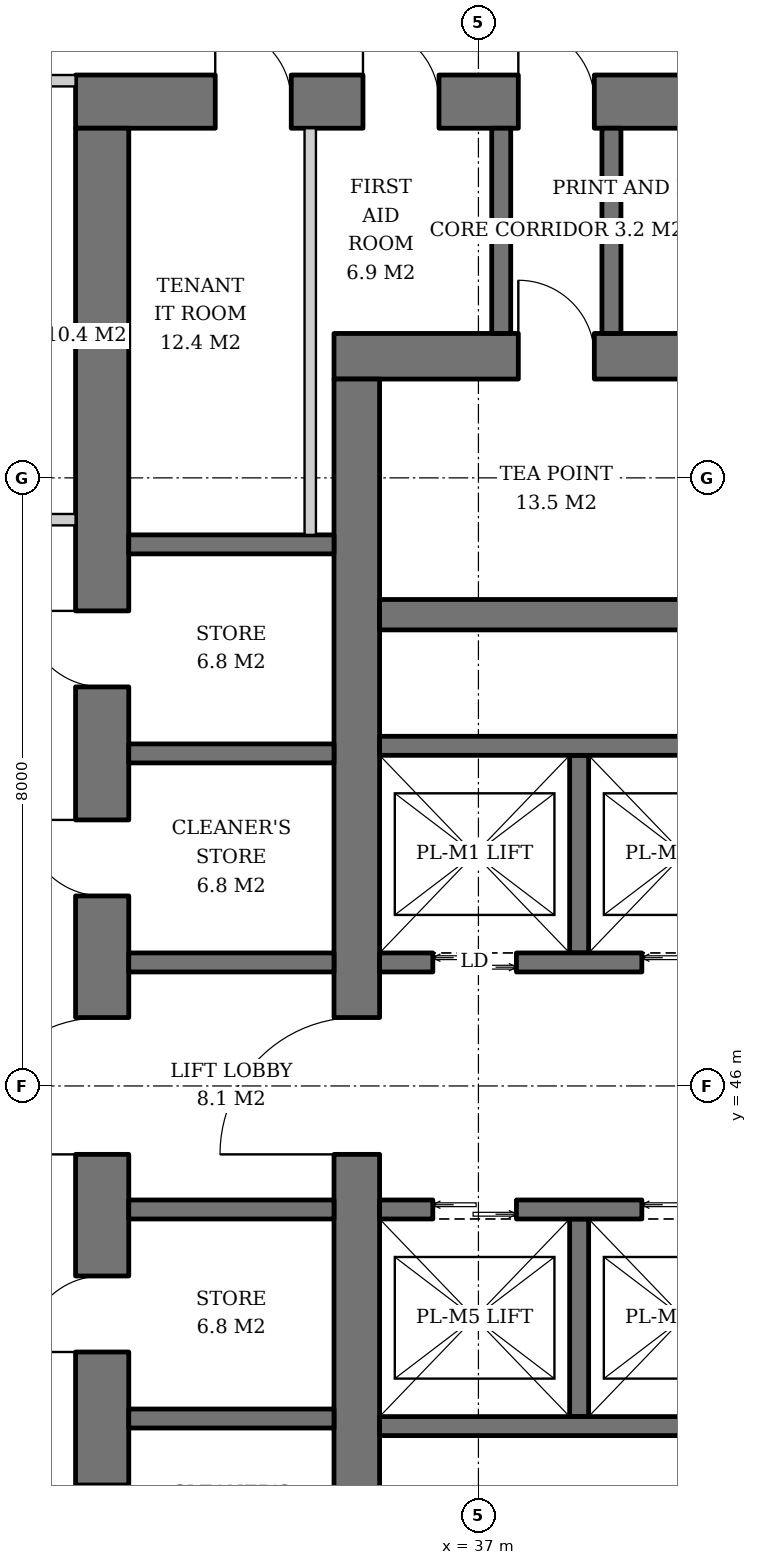
"""IFC4 building model, lengths in metres.
Left out: names, types, materials, properties, quantities, classifications, styles, units other than length and angle.
Written with IfcOpenShell. Run it as: python <this file> out.ifc"""

import sys

from ifc_helpers import new_model, si_unit, direction, frame, frame_2d, origin, place, context, subcontext, project, spatial, rectangle, extrude, element, fill, save


model = new_model("IFC4")
c1 = context("Model", 3, precision=1e-05, world=origin(), true_north=direction((0.0, 1.0)))
c2 = subcontext(c1, "Body", "Model", "MODEL_VIEW")
j1 = project(units=[si_unit("LENGTHUNIT", "METRE"), si_unit("PLANEANGLEUNIT", "RADIAN")], contexts=[c1])
p1 = place(None, origin())
s1 = spatial("IfcSite", under=j1, at=p1, CompositionType="ELEMENT")
p2 = place(p1, origin())
s2 = spatial("IfcBuilding", under=s1, at=p2, CompositionType="ELEMENT")
p3 = place(p2, frame((0.0, 0.0, 154.0)))
s3 = spatial("IfcBuildingStorey", under=s2, at=p3, CompositionType="ELEMENT", Elevation=154.0)
p4 = place(p3, frame((35.1, 55.6, 0.0), z_axis=(0.0, 0.0, 1.0), x_axis=(1.0, 0.0, 0.0)))
e1 = element("IfcWall", 1, at=p4, inside=s3, PredefinedType="SHEAR", context=c2, shape_type="SweptSolid", body=[
    extrude(rectangle(XDim=19.8, YDim=0.6, at=frame_2d((9.9, 0.0))), origin(), (0.0, 0.0, 1.0), 3.8),
])
p5 = place(p4, frame((14.54, 0.0, 0.0)))
e2 = element("IfcOpeningElement", 2, at=p5, cuts=e1, PredefinedType="OPENING", context=c2, shape_type="SweptSolid", body=[
    extrude(rectangle(XDim=1.0, YDim=2.1, at=frame_2d((0.5, 1.05))), frame((0.0, 0.31, 0.0), z_axis=(0.0, -1.0, 0.0), x_axis=(1.0, 0.0, 0.0)), (0.0, 0.0, 1.0), 0.62),
])
p6 = place(p4, frame((2.425, 0.0, 0.0)))
e3 = element("IfcOpeningElement", 3, at=p6, cuts=e1, PredefinedType="OPENING", context=c2, shape_type="SweptSolid", body=[
    extrude(rectangle(XDim=1.0, YDim=2.1, at=frame_2d((0.5, 1.05))), frame((0.0, 0.31, 0.0), z_axis=(0.0, -1.0, 0.0), x_axis=(1.0, 0.0, 0.0)), (0.0, 0.0, 1.0), 0.62),
])
p7 = place(p3, frame((35.4, 36.7, 0.0), z_axis=(0.0, 0.0, 1.0), x_axis=(0.0, 1.0, 0.0)))
e4 = element("IfcWall", 4, at=p7, inside=s3, PredefinedType="SHEAR", context=c2, shape_type="SweptSolid", body=[
    extrude(rectangle(XDim=18.6, YDim=0.6, at=frame_2d((9.3, 0.0))), origin(), (0.0, 0.0, 1.0), 3.8),
])
p8 = place(p7, frame((8.4, 0.0, 0.0)))
e5 = element("IfcOpeningElement", 5, at=p8, cuts=e4, PredefinedType="OPENING", context=c2, shape_type="SweptSolid", body=[
    extrude(rectangle(XDim=1.8, YDim=2.4, at=frame_2d((0.9, 1.2))), frame((0.0, 0.31, 0.0), z_axis=(0.0, -1.0, 0.0), x_axis=(1.0, 0.0, 0.0)), (0.0, 0.0, 1.0), 0.62),
])
p9 = place(p3, frame((31.7, 58.95, 0.0), z_axis=(0.0, 0.0, 1.0), x_axis=(1.0, 0.0, 0.0)))
e6 = element("IfcWall", 6, at=p9, inside=s3, PredefinedType="SHEAR", context=c2, shape_type="SweptSolid", body=[
    extrude(rectangle(XDim=26.6, YDim=0.7, at=frame_2d((13.3, 0.0))), origin(), (0.0, 0.0, 1.0), 3.8),
])
p10 = place(p9, frame((17.94, 0.0, 0.0)))
e7 = element("IfcOpeningElement", 7, at=p10, cuts=e6, PredefinedType="OPENING", context=c2, shape_type="SweptSolid", body=[
    extrude(rectangle(XDim=1.0, YDim=2.1, at=frame_2d((0.5, 1.05))), frame((0.0, 0.36, 0.0), z_axis=(0.0, -1.0, 0.0), x_axis=(1.0, 0.0, 0.0)), (0.0, 0.0, 1.0), 0.72),
])
p11 = place(p9, frame((5.825, 0.0, 0.0)))
e8 = element("IfcOpeningElement", 8, at=p11, cuts=e6, PredefinedType="OPENING", context=c2, shape_type="SweptSolid", body=[
    extrude(rectangle(XDim=1.0, YDim=2.1, at=frame_2d((0.5, 1.05))), frame((0.0, 0.36, 0.0), z_axis=(0.0, -1.0, 0.0), x_axis=(1.0, 0.0, 0.0)), (0.0, 0.0, 1.0), 0.72),
])
p12 = place(p9, frame((1.837, 0.0, 0.0)))
e9 = element("IfcOpeningElement", 9, at=p12, cuts=e6, PredefinedType="OPENING", context=c2, shape_type="SweptSolid", body=[
    extrude(rectangle(XDim=1.0, YDim=2.1, at=frame_2d((0.5, 1.05))), frame((0.0, 0.36, 0.0), z_axis=(0.0, -1.0, 0.0), x_axis=(1.0, 0.0, 0.0)), (0.0, 0.0, 1.0), 0.72),
])
p13 = place(p9, frame((3.781, 0.0, 0.0)))
e10 = element("IfcOpeningElement", 10, at=p13, cuts=e6, PredefinedType="OPENING", context=c2, shape_type="SweptSolid", body=[
    extrude(rectangle(XDim=1.0, YDim=2.1, at=frame_2d((0.5, 1.05))), frame((0.0, 0.36, 0.0), z_axis=(0.0, -1.0, 0.0), x_axis=(1.0, 0.0, 0.0)), (0.0, 0.0, 1.0), 0.72),
])
p14 = place(p9, frame((7.95, 0.0, 0.0)))
e11 = element("IfcOpeningElement", 11, at=p14, cuts=e6, PredefinedType="OPENING", context=c2, shape_type="SweptSolid", body=[
    extrude(rectangle(XDim=1.0, YDim=2.1, at=frame_2d((0.5, 1.05))), frame((0.0, 0.36, 0.0), z_axis=(0.0, -1.0, 0.0), x_axis=(1.0, 0.0, 0.0)), (0.0, 0.0, 1.0), 0.72),
])
p15 = place(p9, frame((11.038, 0.0, 0.0)))
e12 = element("IfcOpeningElement", 12, at=p15, cuts=e6, PredefinedType="OPENING", context=c2, shape_type="SweptSolid", body=[
    extrude(rectangle(XDim=1.0, YDim=2.1, at=frame_2d((0.5, 1.05))), frame((0.0, 0.36, 0.0), z_axis=(0.0, -1.0, 0.0), x_axis=(1.0, 0.0, 0.0)), (0.0, 0.0, 1.0), 0.72),
])
p16 = place(p9, frame((14.666, 0.0, 0.0)))
e13 = element("IfcOpeningElement", 13, at=p16, cuts=e6, PredefinedType="OPENING", context=c2, shape_type="SweptSolid", body=[
    extrude(rectangle(XDim=1.0, YDim=2.1, at=frame_2d((0.5, 1.05))), frame((0.0, 0.36, 0.0), z_axis=(0.0, -1.0, 0.0), x_axis=(1.0, 0.0, 0.0)), (0.0, 0.0, 1.0), 0.72),
])
p17 = place(p9, frame((20.9, 0.0, 0.0)))
e14 = element("IfcOpeningElement", 14, at=p17, cuts=e6, PredefinedType="OPENING", context=c2, shape_type="SweptSolid", body=[
    extrude(rectangle(XDim=1.0, YDim=2.1, at=frame_2d((0.5, 1.05))), frame((0.0, 0.36, 0.0), z_axis=(0.0, -1.0, 0.0), x_axis=(1.0, 0.0, 0.0)), (0.0, 0.0, 1.0), 0.72),
])
p18 = place(p9, frame((23.75, 0.0, 0.0)))
e15 = element("IfcOpeningElement", 15, at=p18, cuts=e6, PredefinedType="OPENING", context=c2, shape_type="SweptSolid", body=[
    extrude(rectangle(XDim=1.0, YDim=2.1, at=frame_2d((0.5, 1.05))), frame((0.0, 0.36, 0.0), z_axis=(0.0, -1.0, 0.0), x_axis=(1.0, 0.0, 0.0)), (0.0, 0.0, 1.0), 0.72),
])
p19 = place(p3, frame((32.05, 33.4, 0.0), z_axis=(0.0, 0.0, 1.0), x_axis=(0.0, 1.0, 0.0)))
e16 = element("IfcWall", 16, at=p19, inside=s3, PredefinedType="SHEAR", context=c2, shape_type="SweptSolid", body=[
    extrude(rectangle(XDim=25.2, YDim=0.7, at=frame_2d((12.6, 0.0))), origin(), (0.0, 0.0, 1.0), 3.8),
])
p20 = place(p19, frame((11.7, 0.0, 0.0)))
e17 = element("IfcOpeningElement", 17, at=p20, cuts=e16, PredefinedType="OPENING", context=c2, shape_type="SweptSolid", body=[
    extrude(rectangle(XDim=1.8, YDim=2.4, at=frame_2d((0.9, 1.2))), frame((0.0, 0.36, 0.0), z_axis=(0.0, -1.0, 0.0), x_axis=(1.0, 0.0, 0.0)), (0.0, 0.0, 1.0), 0.72),
])
p21 = place(p19, frame((3.6, 0.0, 0.0)))
e18 = element("IfcOpeningElement", 18, at=p21, cuts=e16, PredefinedType="OPENING", context=c2, shape_type="SweptSolid", body=[
    extrude(rectangle(XDim=1.0, YDim=2.1, at=frame_2d((0.5, 1.05))), frame((0.0, 0.36, 0.0), z_axis=(0.0, -1.0, 0.0), x_axis=(1.0, 0.0, 0.0)), (0.0, 0.0, 1.0), 0.72),
])
p22 = place(p19, frame((6.35, 0.0, 0.0)))
e19 = element("IfcOpeningElement", 19, at=p22, cuts=e16, PredefinedType="OPENING", context=c2, shape_type="SweptSolid", body=[
    extrude(rectangle(XDim=1.0, YDim=2.1, at=frame_2d((0.5, 1.05))), frame((0.0, 0.36, 0.0), z_axis=(0.0, -1.0, 0.0), x_axis=(1.0, 0.0, 0.0)), (0.0, 0.0, 1.0), 0.72),
])
p23 = place(p19, frame((9.1, 0.0, 0.0)))
e20 = element("IfcOpeningElement", 20, at=p23, cuts=e16, PredefinedType="OPENING", context=c2, shape_type="SweptSolid", body=[
    extrude(rectangle(XDim=1.0, YDim=2.1, at=frame_2d((0.5, 1.05))), frame((0.0, 0.36, 0.0), z_axis=(0.0, -1.0, 0.0), x_axis=(1.0, 0.0, 0.0)), (0.0, 0.0, 1.0), 0.72),
])
p24 = place(p19, frame((15.1, 0.0, 0.0)))
e21 = element("IfcOpeningElement", 21, at=p24, cuts=e16, PredefinedType="OPENING", context=c2, shape_type="SweptSolid", body=[
    extrude(rectangle(XDim=1.0, YDim=2.1, at=frame_2d((0.5, 1.05))), frame((0.0, 0.36, 0.0), z_axis=(0.0, -1.0, 0.0), x_axis=(1.0, 0.0, 0.0)), (0.0, 0.0, 1.0), 0.72),
])
p25 = place(p19, frame((17.85, 0.0, 0.0)))
e22 = element("IfcOpeningElement", 22, at=p25, cuts=e16, PredefinedType="OPENING", context=c2, shape_type="SweptSolid", body=[
    extrude(rectangle(XDim=1.0, YDim=2.1, at=frame_2d((0.5, 1.05))), frame((0.0, 0.36, 0.0), z_axis=(0.0, -1.0, 0.0), x_axis=(1.0, 0.0, 0.0)), (0.0, 0.0, 1.0), 0.72),
])
p26 = place(p3, frame((35.7, 52.2, 0.0), z_axis=(0.0, 0.0, 1.0), x_axis=(1.0, 0.0, 0.0)))
e23 = element("IfcWall", 23, at=p26, inside=s3, PredefinedType="SHEAR", context=c2, shape_type="SweptSolid", body=[
    extrude(rectangle(XDim=18.6, YDim=0.4, at=frame_2d((9.3, 0.0))), origin(), (0.0, 0.0, 1.0), 3.8),
])
p27 = place(p3, frame((38.325, 47.75, 0.0), z_axis=(0.0, 0.0, 1.0), x_axis=(0.0, 1.0, 0.0)))
e24 = element("IfcWall", 24, at=p27, inside=s3, PredefinedType="SHEAR", context=c2, shape_type="SweptSolid", body=[
    extrude(rectangle(XDim=2.6, YDim=0.25, at=frame_2d((1.3, 0.0))), origin(), (0.0, 0.0, 1.0), 3.8),
])
p28 = place(p3, frame((35.7, 50.475, 0.0), z_axis=(0.0, 0.0, 1.0), x_axis=(1.0, 0.0, 0.0)))
e25 = element("IfcWall", 25, at=p28, inside=s3, PredefinedType="SHEAR", context=c2, shape_type="SweptSolid", body=[
    extrude(rectangle(XDim=11.0, YDim=0.25, at=frame_2d((5.5, 0.0))), origin(), (0.0, 0.0, 1.0), 3.8),
])
p29 = place(p3, frame((35.7, 47.625, 0.0), z_axis=(0.0, 0.0, 1.0), x_axis=(1.0, 0.0, 0.0)))
e26 = element("IfcWall", 26, at=p29, inside=s3, PredefinedType="SHEAR", context=c2, shape_type="SweptSolid", body=[
    extrude(rectangle(XDim=12.83, YDim=0.25, at=frame_2d((6.415, 0.0))), origin(), (0.0, 0.0, 1.0), 3.8),
])
p30 = place(p29, frame((0.7, 0.0, 0.0)))
e27 = element("IfcOpeningElement", 27, at=p30, cuts=e26, PredefinedType="OPENING", context=c2, shape_type="SweptSolid", body=[
    extrude(rectangle(XDim=1.1, YDim=2.2, at=frame_2d((0.55, 1.1))), frame((0.0, 0.135, 0.0), z_axis=(0.0, -1.0, 0.0), x_axis=(1.0, 0.0, 0.0)), (0.0, 0.0, 1.0), 0.27),
])
p31 = place(p29, frame((3.45, 0.0, 0.0)))
e28 = element("IfcOpeningElement", 28, at=p31, cuts=e26, PredefinedType="OPENING", context=c2, shape_type="SweptSolid", body=[
    extrude(rectangle(XDim=1.1, YDim=2.2, at=frame_2d((0.55, 1.1))), frame((0.0, 0.135, 0.0), z_axis=(0.0, -1.0, 0.0), x_axis=(1.0, 0.0, 0.0)), (0.0, 0.0, 1.0), 0.27),
])
p32 = place(p29, frame((6.2, 0.0, 0.0)))
e29 = element("IfcOpeningElement", 29, at=p32, cuts=e26, PredefinedType="OPENING", context=c2, shape_type="SweptSolid", body=[
    extrude(rectangle(XDim=1.1, YDim=2.2, at=frame_2d((0.55, 1.1))), frame((0.0, 0.135, 0.0), z_axis=(0.0, -1.0, 0.0), x_axis=(1.0, 0.0, 0.0)), (0.0, 0.0, 1.0), 0.27),
])
p33 = place(p29, frame((8.95, 0.0, 0.0)))
e30 = element("IfcOpeningElement", 30, at=p33, cuts=e26, PredefinedType="OPENING", context=c2, shape_type="SweptSolid", body=[
    extrude(rectangle(XDim=1.1, YDim=2.2, at=frame_2d((0.55, 1.1))), frame((0.0, 0.135, 0.0), z_axis=(0.0, -1.0, 0.0), x_axis=(1.0, 0.0, 0.0)), (0.0, 0.0, 1.0), 0.27),
])
p34 = place(p29, frame((11.515, 0.0, 0.0)))
e31 = element("IfcOpeningElement", 31, at=p34, cuts=e26, PredefinedType="OPENING", context=c2, shape_type="SweptSolid", body=[
    extrude(rectangle(XDim=0.8, YDim=2.0, at=frame_2d((0.4, 1.0))), frame((0.0, 0.135, 0.0), z_axis=(0.0, -1.0, 0.0), x_axis=(1.0, 0.0, 0.0)), (0.0, 0.0, 1.0), 0.27),
])
p35 = place(p3, frame((38.325, 44.25, 0.0), z_axis=(0.0, 0.0, 1.0), x_axis=(0.0, -1.0, 0.0)))
e32 = element("IfcWall", 32, at=p35, inside=s3, PredefinedType="SHEAR", context=c2, shape_type="SweptSolid", body=[
    extrude(rectangle(XDim=2.6, YDim=0.25, at=frame_2d((1.3, 0.0))), origin(), (0.0, 0.0, 1.0), 3.8),
])
p36 = place(p3, frame((35.7, 41.525, 0.0), z_axis=(0.0, 0.0, 1.0), x_axis=(1.0, 0.0, 0.0)))
e33 = element("IfcWall", 33, at=p36, inside=s3, PredefinedType="SHEAR", context=c2, shape_type="SweptSolid", body=[
    extrude(rectangle(XDim=11.0, YDim=0.25, at=frame_2d((5.5, 0.0))), origin(), (0.0, 0.0, 1.0), 3.8),
])
p37 = place(p3, frame((35.7, 44.375, 0.0), z_axis=(0.0, 0.0, 1.0), x_axis=(1.0, 0.0, 0.0)))
e34 = element("IfcWall", 34, at=p37, inside=s3, PredefinedType="SHEAR", context=c2, shape_type="SweptSolid", body=[
    extrude(rectangle(XDim=12.83, YDim=0.25, at=frame_2d((6.415, 0.0))), origin(), (0.0, 0.0, 1.0), 3.8),
])
p38 = place(p37, frame((0.7, 0.0, 0.0)))
e35 = element("IfcOpeningElement", 35, at=p38, cuts=e34, PredefinedType="OPENING", context=c2, shape_type="SweptSolid", body=[
    extrude(rectangle(XDim=1.1, YDim=2.2, at=frame_2d((0.55, 1.1))), frame((0.0, 0.135, 0.0), z_axis=(0.0, -1.0, 0.0), x_axis=(1.0, 0.0, 0.0)), (0.0, 0.0, 1.0), 0.27),
])
p39 = place(p37, frame((3.45, 0.0, 0.0)))
e36 = element("IfcOpeningElement", 36, at=p39, cuts=e34, PredefinedType="OPENING", context=c2, shape_type="SweptSolid", body=[
    extrude(rectangle(XDim=1.1, YDim=2.2, at=frame_2d((0.55, 1.1))), frame((0.0, 0.135, 0.0), z_axis=(0.0, -1.0, 0.0), x_axis=(1.0, 0.0, 0.0)), (0.0, 0.0, 1.0), 0.27),
])
p40 = place(p37, frame((6.2, 0.0, 0.0)))
e37 = element("IfcOpeningElement", 37, at=p40, cuts=e34, PredefinedType="OPENING", context=c2, shape_type="SweptSolid", body=[
    extrude(rectangle(XDim=1.1, YDim=2.2, at=frame_2d((0.55, 1.1))), frame((0.0, 0.135, 0.0), z_axis=(0.0, -1.0, 0.0), x_axis=(1.0, 0.0, 0.0)), (0.0, 0.0, 1.0), 0.27),
])
p41 = place(p37, frame((8.95, 0.0, 0.0)))
e38 = element("IfcOpeningElement", 38, at=p41, cuts=e34, PredefinedType="OPENING", context=c2, shape_type="SweptSolid", body=[
    extrude(rectangle(XDim=1.1, YDim=2.2, at=frame_2d((0.55, 1.1))), frame((0.0, 0.135, 0.0), z_axis=(0.0, -1.0, 0.0), x_axis=(1.0, 0.0, 0.0)), (0.0, 0.0, 1.0), 0.27),
])
p42 = place(p37, frame((11.515, 0.0, 0.0)))
e39 = element("IfcOpeningElement", 39, at=p42, cuts=e34, PredefinedType="OPENING", context=c2, shape_type="SweptSolid", body=[
    extrude(rectangle(XDim=0.8, YDim=2.0, at=frame_2d((0.4, 1.0))), frame((0.0, 0.135, 0.0), z_axis=(0.0, -1.0, 0.0), x_axis=(1.0, 0.0, 0.0)), (0.0, 0.0, 1.0), 0.27),
])
for number, where, z_axis, x_axis in (
    (40, (32.4, 41.625, 0.0), (0.0, 0.0, 1.0), (1.0, 0.0, 0.0)),
    (41, (32.4, 44.375, 0.0), (0.0, 0.0, 1.0), (1.0, 0.0, 0.0)),
    (42, (32.4, 47.625, 0.0), (0.0, 0.0, 1.0), (1.0, 0.0, 0.0)),
    (43, (32.4, 50.375, 0.0), (0.0, 0.0, 1.0), (1.0, 0.0, 0.0)),
    (44, (32.4, 53.125, 0.0), (0.0, 0.0, 1.0), (1.0, 0.0, 0.0)),
):
    element("IfcWall", number, at=place(p3, frame(where, z_axis=z_axis, x_axis=x_axis)), inside=s3, PredefinedType="SHEAR", context=c2, shape_type="SweptSolid", body=[
        extrude(rectangle(XDim=2.7, YDim=0.25, at=frame_2d((1.35, 0.0))), origin(), (0.0, 0.0, 1.0), 3.8),
    ])
for number, where, z_axis, x_axis in (
    (45, (37.3, 55.9, 0.0), (0.0, 0.0, 1.0), (0.0, 1.0, 0.0)),
    (46, (38.75, 55.9, 0.0), (0.0, 0.0, 1.0), (0.0, 1.0, 0.0)),
):
    element("IfcWall", number, at=place(p3, frame(where, z_axis=z_axis, x_axis=x_axis)), inside=s3, PredefinedType="SOLIDWALL", context=c2, shape_type="SweptSolid", body=[
        extrude(rectangle(XDim=2.7, YDim=0.25, at=frame_2d((1.35, 0.0))), origin(), (0.0, 0.0, 1.0), 3.52),
    ])
p43 = place(p3, frame((34.788, 53.25, 0.0), z_axis=(0.0, 0.0, 1.0), x_axis=(0.0, 1.0, 0.0)))
e47 = element("IfcWall", 47, at=p43, inside=s3, PredefinedType="SOLIDWALL", context=c2, shape_type="SweptSolid", body=[
    extrude(rectangle(XDim=5.35, YDim=0.15, at=frame_2d((2.675, 0.0))), origin(), (0.0, 0.0, 1.0), 3.52),
])
for number, where, z_axis, x_axis in (
    (48, (31.7, 59.225, 0.0), (0.0, 0.0, 1.0), (-1.0, 0.0, 0.0)),
    (49, (31.7, 53.45, 0.0), (0.0, 0.0, 1.0), (-1.0, 0.0, 0.0)),
):
    element("IfcWall", number, at=place(p3, frame(where, z_axis=z_axis, x_axis=x_axis)), inside=s3, PredefinedType="PARTITIONING", context=c2, shape_type="SweptSolid", body=[
        extrude(rectangle(XDim=1.725, YDim=0.15, at=frame_2d((0.862, 0.0))), origin(), (0.0, 0.0, 1.0), 3.52),
    ])
p44 = place(p30, origin())
e50 = element("IfcDoor", 50, at=p44, inside=s3, OperationType="DOUBLE_DOOR_SLIDING", PredefinedType="DOOR", context=c2, shape_type="SweptSolid", body=[
    extrude(rectangle(XDim=1.1, YDim=2.2, at=frame_2d((0.55, 1.1))), frame((0.0, 0.025, 0.0), z_axis=(0.0, -1.0, 0.0), x_axis=(1.0, 0.0, 0.0)), (0.0, 0.0, 1.0), 0.05),
])
fill(e27, e50)
p45 = place(p31, origin())
e51 = element("IfcDoor", 51, at=p45, inside=s3, OperationType="DOUBLE_DOOR_SLIDING", PredefinedType="DOOR", context=c2, shape_type="SweptSolid", body=[
    extrude(rectangle(XDim=1.1, YDim=2.2, at=frame_2d((0.55, 1.1))), frame((0.0, 0.025, 0.0), z_axis=(0.0, -1.0, 0.0), x_axis=(1.0, 0.0, 0.0)), (0.0, 0.0, 1.0), 0.05),
])
fill(e28, e51)
p46 = place(p38, origin())
e52 = element("IfcDoor", 52, at=p46, inside=s3, OperationType="DOUBLE_DOOR_SLIDING", PredefinedType="DOOR", context=c2, shape_type="SweptSolid", body=[
    extrude(rectangle(XDim=1.1, YDim=2.2, at=frame_2d((0.55, 1.1))), frame((0.0, 0.025, 0.0), z_axis=(0.0, -1.0, 0.0), x_axis=(1.0, 0.0, 0.0)), (0.0, 0.0, 1.0), 0.05),
])
fill(e35, e52)
p47 = place(p39, origin())
e53 = element("IfcDoor", 53, at=p47, inside=s3, OperationType="DOUBLE_DOOR_SLIDING", PredefinedType="DOOR", context=c2, shape_type="SweptSolid", body=[
    extrude(rectangle(XDim=1.1, YDim=2.2, at=frame_2d((0.55, 1.1))), frame((0.0, 0.025, 0.0), z_axis=(0.0, -1.0, 0.0), x_axis=(1.0, 0.0, 0.0)), (0.0, 0.0, 1.0), 0.05),
])
fill(e36, e53)
p48 = place(p8, origin())
e54 = element("IfcDoor", 54, at=p48, inside=s3, OperationType="DOUBLE_DOOR_SINGLE_SWING", PredefinedType="DOOR", context=c2, shape_type="SweptSolid", body=[
    extrude(rectangle(XDim=1.8, YDim=2.4, at=frame_2d((0.9, 1.2))), frame((0.0, 0.025, 0.0), z_axis=(0.0, -1.0, 0.0), x_axis=(1.0, 0.0, 0.0)), (0.0, 0.0, 1.0), 0.05),
])
fill(e5, e54)
p49 = place(p20, origin())
e55 = element("IfcDoor", 55, at=p49, inside=s3, OperationType="DOUBLE_DOOR_SINGLE_SWING", PredefinedType="DOOR", context=c2, shape_type="SweptSolid", body=[
    extrude(rectangle(XDim=1.8, YDim=2.4, at=frame_2d((0.9, 1.2))), frame((0.0, 0.025, 0.0), z_axis=(0.0, -1.0, 0.0), x_axis=(1.0, 0.0, 0.0)), (0.0, 0.0, 1.0), 0.05),
])
fill(e17, e55)
p50 = place(p11, origin())
e56 = element("IfcDoor", 56, at=p50, inside=s3, OperationType="SINGLE_SWING_LEFT", PredefinedType="DOOR", context=c2, shape_type="SweptSolid", body=[
    extrude(rectangle(XDim=1.0, YDim=2.1, at=frame_2d((0.5, 1.05))), frame((0.0, 0.025, 0.0), z_axis=(0.0, -1.0, 0.0), x_axis=(1.0, 0.0, 0.0)), (0.0, 0.0, 1.0), 0.05),
])
fill(e8, e56)
p51 = place(p6, origin())
e57 = element("IfcDoor", 57, at=p51, inside=s3, OperationType="SINGLE_SWING_LEFT", PredefinedType="DOOR", context=c2, shape_type="SweptSolid", body=[
    extrude(rectangle(XDim=1.0, YDim=2.1, at=frame_2d((0.5, 1.05))), frame((0.0, -0.24, 0.0), z_axis=(0.0, -1.0, 0.0), x_axis=(1.0, 0.0, 0.0)), (0.0, 0.0, 1.0), 0.05),
])
fill(e3, e57)
p52 = place(p23, origin())
e58 = element("IfcDoor", 58, at=p52, inside=s3, OperationType="SINGLE_SWING_LEFT", PredefinedType="DOOR", context=c2, shape_type="SweptSolid", body=[
    extrude(rectangle(XDim=1.0, YDim=2.1, at=frame_2d((0.5, 1.05))), frame((0.0, -0.29, 0.0), z_axis=(0.0, -1.0, 0.0), x_axis=(1.0, 0.0, 0.0)), (0.0, 0.0, 1.0), 0.05),
])
fill(e20, e58)
p53 = place(p24, origin())
e59 = element("IfcDoor", 59, at=p53, inside=s3, OperationType="SINGLE_SWING_RIGHT", PredefinedType="DOOR", context=c2, shape_type="SweptSolid", body=[
    extrude(rectangle(XDim=1.0, YDim=2.1, at=frame_2d((0.5, 1.05))), frame((0.0, -0.29, 0.0), z_axis=(0.0, -1.0, 0.0), x_axis=(1.0, 0.0, 0.0)), (0.0, 0.0, 1.0), 0.05),
])
fill(e21, e59)
p54 = place(p25, origin())
e60 = element("IfcDoor", 60, at=p54, inside=s3, OperationType="SINGLE_SWING_RIGHT", PredefinedType="DOOR", context=c2, shape_type="SweptSolid", body=[
    extrude(rectangle(XDim=1.0, YDim=2.1, at=frame_2d((0.5, 1.05))), frame((0.0, -0.29, 0.0), z_axis=(0.0, -1.0, 0.0), x_axis=(1.0, 0.0, 0.0)), (0.0, 0.0, 1.0), 0.05),
])
fill(e22, e60)
p55 = place(p12, origin())
e61 = element("IfcDoor", 61, at=p55, inside=s3, OperationType="SINGLE_SWING_LEFT", PredefinedType="DOOR", context=c2, shape_type="SweptSolid", body=[
    extrude(rectangle(XDim=1.0, YDim=2.1, at=frame_2d((0.5, 1.05))), frame((0.0, -0.29, 0.0), z_axis=(0.0, -1.0, 0.0), x_axis=(1.0, 0.0, 0.0)), (0.0, 0.0, 1.0), 0.05),
])
fill(e9, e61)
p56 = place(p13, origin())
e62 = element("IfcDoor", 62, at=p56, inside=s3, OperationType="SINGLE_SWING_LEFT", PredefinedType="DOOR", context=c2, shape_type="SweptSolid", body=[
    extrude(rectangle(XDim=1.0, YDim=2.1, at=frame_2d((0.5, 1.05))), frame((0.0, -0.29, 0.0), z_axis=(0.0, -1.0, 0.0), x_axis=(1.0, 0.0, 0.0)), (0.0, 0.0, 1.0), 0.05),
])
fill(e10, e62)
save(model, sys.argv[1])
